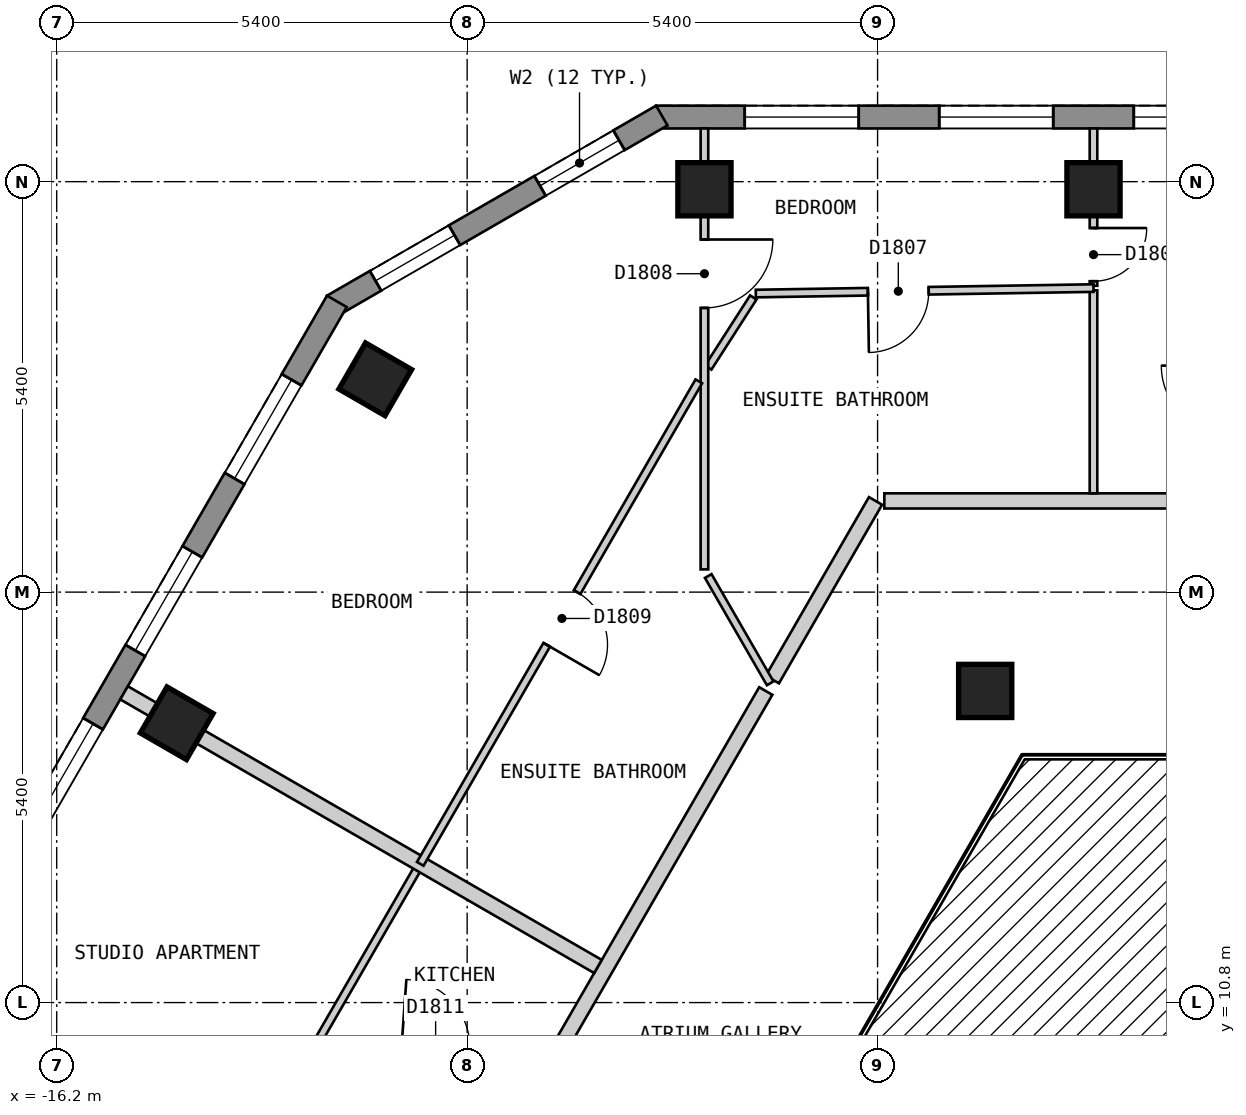
"""IFC4 building model, lengths in metres.
Left out: names, types, materials, properties, quantities, classifications, styles, units other than length and angle.
Written with IfcOpenShell. Run it as: python <this file> out.ifc"""

import sys

from ifc_helpers import new_model, si_unit, direction, frame, frame_2d, origin, origin_2d, place, context, subcontext, project, spatial, polyline, rectangle, outline, extrude, element, fill, save


model = new_model("IFC4")
c1 = context("Model", 3, precision=1e-05, world=origin(), true_north=direction((0.0, 1.0)))
c2 = subcontext(c1, "Body", "Model", "MODEL_VIEW")
j1 = project(units=[si_unit("LENGTHUNIT", "METRE"), si_unit("PLANEANGLEUNIT", "RADIAN")], contexts=[c1])
p1 = place(None, origin())
s1 = spatial("IfcSite", under=j1, at=p1, CompositionType="ELEMENT")
p2 = place(p1, origin())
s2 = spatial("IfcBuilding", under=s1, at=p2, CompositionType="ELEMENT")
p3 = place(p2, frame((0.0, 0.0, 208.8)))
s3 = spatial("IfcBuildingStorey", under=s2, at=p3, CompositionType="ELEMENT", Elevation=208.8)
for number, where, z_axis, x_axis in (
    (1, (-2.559, 21.5, 0.0), (0.0, 0.0, 1.0), (-1.0, 0.0, 0.0)),
    (2, (-7.678, 21.5, 0.0), (0.0, 0.0, 1.0), (-1.0, 0.0, 0.0)),
    (3, (-12.009, 19.0, 0.0), (0.0, 0.0, 1.0), (-0.5, -0.866, 0.0)),
    (4, (-14.621, 14.475, 0.0), (0.0, 0.0, 1.0), (-0.5, -0.866, 0.0)),
    (5, (-3.984, 14.9, 0.0), (0.0, 0.0, 1.0), (1.0, 0.0, 0.0)),
):
    element("IfcColumn", number, at=place(p3, frame(where, z_axis=z_axis, x_axis=x_axis)), inside=s3, PredefinedType="COLUMN", context=c2, shape_type="SweptSolid", body=[
        extrude(rectangle(XDim=0.7, YDim=0.7, at=origin_2d()), origin(), (0.0, 0.0, 1.0), 3.0),
    ])
p4 = place(p3, frame((8.314, 22.45, 0.0), z_axis=(0.0, 0.0, 1.0), x_axis=(-1.0, 0.0, 0.0)))
e6 = element("IfcWall", 6, at=p4, inside=s3, PredefinedType="SOLIDWALL", context=c2, shape_type="SweptSolid", body=[
    extrude(outline(polyline([(0.0, -0.15), (16.628, -0.15), (16.548, 0.15), (0.08, 0.15), (0.0, -0.15)])), origin(), (0.0, 0.0, 1.0), 2.7),
])
p5 = place(p4, frame((1.165, 0.0, 0.15)))
e7 = element("IfcOpeningElement", 7, at=p5, cuts=e6, PredefinedType="OPENING", context=c2, shape_type="SweptSolid", body=[
    extrude(rectangle(XDim=1.5, YDim=2.1, at=frame_2d((0.75, 1.05))), frame((0.0, 0.16, 0.0), z_axis=(0.0, -1.0, 0.0), x_axis=(1.0, 0.0, 0.0)), (0.0, 0.0, 1.0), 0.32),
])
p6 = place(p4, frame((3.724, 0.0, 0.15)))
e8 = element("IfcOpeningElement", 8, at=p6, cuts=e6, PredefinedType="OPENING", context=c2, shape_type="SweptSolid", body=[
    extrude(rectangle(XDim=1.5, YDim=2.1, at=frame_2d((0.75, 1.05))), frame((0.0, 0.16, 0.0), z_axis=(0.0, -1.0, 0.0), x_axis=(1.0, 0.0, 0.0)), (0.0, 0.0, 1.0), 0.32),
])
p7 = place(p4, frame((6.284, 0.0, 0.15)))
e9 = element("IfcOpeningElement", 9, at=p7, cuts=e6, PredefinedType="OPENING", context=c2, shape_type="SweptSolid", body=[
    extrude(rectangle(XDim=1.5, YDim=2.1, at=frame_2d((0.75, 1.05))), frame((0.0, 0.16, 0.0), z_axis=(0.0, -1.0, 0.0), x_axis=(1.0, 0.0, 0.0)), (0.0, 0.0, 1.0), 0.32),
])
p8 = place(p4, frame((8.843, 0.0, 0.15)))
e10 = element("IfcOpeningElement", 10, at=p8, cuts=e6, PredefinedType="OPENING", context=c2, shape_type="SweptSolid", body=[
    extrude(rectangle(XDim=1.5, YDim=2.1, at=frame_2d((0.75, 1.05))), frame((0.0, 0.16, 0.0), z_axis=(0.0, -1.0, 0.0), x_axis=(1.0, 0.0, 0.0)), (0.0, 0.0, 1.0), 0.32),
])
p9 = place(p4, frame((11.403, 0.0, 0.15)))
e11 = element("IfcOpeningElement", 11, at=p9, cuts=e6, PredefinedType="OPENING", context=c2, shape_type="SweptSolid", body=[
    extrude(rectangle(XDim=1.5, YDim=2.1, at=frame_2d((0.75, 1.05))), frame((0.0, 0.16, 0.0), z_axis=(0.0, -1.0, 0.0), x_axis=(1.0, 0.0, 0.0)), (0.0, 0.0, 1.0), 0.32),
])
p10 = place(p4, frame((13.962, 0.0, 0.15)))
e12 = element("IfcOpeningElement", 12, at=p10, cuts=e6, PredefinedType="OPENING", context=c2, shape_type="SweptSolid", body=[
    extrude(rectangle(XDim=1.5, YDim=2.1, at=frame_2d((0.75, 1.05))), frame((0.0, 0.16, 0.0), z_axis=(0.0, -1.0, 0.0), x_axis=(1.0, 0.0, 0.0)), (0.0, 0.0, 1.0), 0.32),
])
p11 = place(p3, frame((-8.239, 22.47, 0.0), z_axis=(0.0, 0.0, 1.0), x_axis=(-0.866022959057, -0.500004234368, 0.0)))
e13 = element("IfcWall", 13, at=p11, inside=s3, PredefinedType="SOLIDWALL", context=c2, shape_type="SweptSolid", body=[
    extrude(outline(polyline([(0.0, -0.15), (5.0, -0.15), (4.92, 0.15), (0.08, 0.15), (0.0, -0.15)])), origin(), (0.0, 0.0, 1.0), 2.7),
])
p12 = place(p11, frame((0.65, 0.0, 0.15)))
e14 = element("IfcOpeningElement", 14, at=p12, cuts=e13, PredefinedType="OPENING", context=c2, shape_type="SweptSolid", body=[
    extrude(rectangle(XDim=1.2, YDim=2.1, at=frame_2d((0.6, 1.05))), frame((0.0, 0.16, 0.0), z_axis=(0.0, -1.0, 0.0), x_axis=(1.0, 0.0, 0.0)), (0.0, 0.0, 1.0), 0.32),
])
p13 = place(p11, frame((3.149, 0.0, 0.15)))
e15 = element("IfcOpeningElement", 15, at=p13, cuts=e13, PredefinedType="OPENING", context=c2, shape_type="SweptSolid", body=[
    extrude(rectangle(XDim=1.2, YDim=2.1, at=frame_2d((0.6, 1.05))), frame((0.0, 0.16, 0.0), z_axis=(0.0, -1.0, 0.0), x_axis=(1.0, 0.0, 0.0)), (0.0, 0.0, 1.0), 0.32),
])
p14 = place(p3, frame((-12.514, 20.025, 0.0), z_axis=(0.0, 0.0, 1.0), x_axis=(-0.500003656944, -0.866023292436, 0.0)))
e16 = element("IfcWall", 16, at=p14, inside=s3, PredefinedType="SOLIDWALL", context=c2, shape_type="SweptSolid", body=[
    extrude(outline(polyline([(0.0, -0.15), (22.17, -0.15), (22.09, 0.15), (0.08, 0.15), (0.0, -0.15)])), origin(), (0.0, 0.0, 1.0), 2.7),
])
p15 = place(p14, frame((1.191, 0.0, 0.15)))
e17 = element("IfcOpeningElement", 17, at=p15, cuts=e16, PredefinedType="OPENING", context=c2, shape_type="SweptSolid", body=[
    extrude(rectangle(XDim=1.5, YDim=2.1, at=frame_2d((0.75, 1.05))), frame((0.0, 0.16, 0.0), z_axis=(0.0, -1.0, 0.0), x_axis=(1.0, 0.0, 0.0)), (0.0, 0.0, 1.0), 0.32),
])
p16 = place(p14, frame((3.804, 0.0, 0.15)))
e18 = element("IfcOpeningElement", 18, at=p16, cuts=e16, PredefinedType="OPENING", context=c2, shape_type="SweptSolid", body=[
    extrude(rectangle(XDim=1.5, YDim=2.1, at=frame_2d((0.75, 1.05))), frame((0.0, 0.16, 0.0), z_axis=(0.0, -1.0, 0.0), x_axis=(1.0, 0.0, 0.0)), (0.0, 0.0, 1.0), 0.32),
])
p17 = place(p14, frame((6.416, 0.0, 0.15)))
e19 = element("IfcOpeningElement", 19, at=p17, cuts=e16, PredefinedType="OPENING", context=c2, shape_type="SweptSolid", body=[
    extrude(rectangle(XDim=1.5, YDim=2.1, at=frame_2d((0.75, 1.05))), frame((0.0, 0.16, 0.0), z_axis=(0.0, -1.0, 0.0), x_axis=(1.0, 0.0, 0.0)), (0.0, 0.0, 1.0), 0.32),
])
p18 = place(p14, frame((9.029, 0.0, 0.15)))
e20 = element("IfcOpeningElement", 20, at=p18, cuts=e16, PredefinedType="OPENING", context=c2, shape_type="SweptSolid", body=[
    extrude(rectangle(XDim=1.5, YDim=2.1, at=frame_2d((0.75, 1.05))), frame((0.0, 0.16, 0.0), z_axis=(0.0, -1.0, 0.0), x_axis=(1.0, 0.0, 0.0)), (0.0, 0.0, 1.0), 0.32),
])
p19 = place(p14, frame((11.641, 0.0, 0.15)))
e21 = element("IfcOpeningElement", 21, at=p19, cuts=e16, PredefinedType="OPENING", context=c2, shape_type="SweptSolid", body=[
    extrude(rectangle(XDim=1.5, YDim=2.1, at=frame_2d((0.75, 1.05))), frame((0.0, 0.16, 0.0), z_axis=(0.0, -1.0, 0.0), x_axis=(1.0, 0.0, 0.0)), (0.0, 0.0, 1.0), 0.32),
])
p20 = place(p14, frame((14.254, 0.0, 0.15)))
e22 = element("IfcOpeningElement", 22, at=p20, cuts=e16, PredefinedType="OPENING", context=c2, shape_type="SweptSolid", body=[
    extrude(rectangle(XDim=1.5, YDim=2.1, at=frame_2d((0.75, 1.05))), frame((0.0, 0.16, 0.0), z_axis=(0.0, -1.0, 0.0), x_axis=(1.0, 0.0, 0.0)), (0.0, 0.0, 1.0), 0.32),
])
p21 = place(p14, frame((16.866, 0.0, 0.15)))
e23 = element("IfcOpeningElement", 23, at=p21, cuts=e16, PredefinedType="OPENING", context=c2, shape_type="SweptSolid", body=[
    extrude(rectangle(XDim=1.5, YDim=2.1, at=frame_2d((0.75, 1.05))), frame((0.0, 0.16, 0.0), z_axis=(0.0, -1.0, 0.0), x_axis=(1.0, 0.0, 0.0)), (0.0, 0.0, 1.0), 0.32),
])
p22 = place(p14, frame((19.479, 0.0, 0.15)))
e24 = element("IfcOpeningElement", 24, at=p22, cuts=e16, PredefinedType="OPENING", context=c2, shape_type="SweptSolid", body=[
    extrude(rectangle(XDim=1.5, YDim=2.1, at=frame_2d((0.75, 1.05))), frame((0.0, 0.16, 0.0), z_axis=(0.0, -1.0, 0.0), x_axis=(1.0, 0.0, 0.0)), (0.0, 0.0, 1.0), 0.32),
])
p23 = place(p3, frame((-5.311, 17.4, 0.0), z_axis=(0.0, 0.0, 1.0), x_axis=(1.0, 0.0, 0.0)))
e25 = element("IfcWall", 25, at=p23, inside=s3, PredefinedType="PARTITIONING", context=c2, shape_type="SweptSolid", body=[
    extrude(rectangle(XDim=10.737, YDim=0.2, at=frame_2d((5.369, 0.0))), origin(), (0.0, 0.0, 1.0), 2.7),
])
p24 = place(p23, frame((4.812, 0.0, 0.0)))
e26 = element("IfcOpeningElement", 26, at=p24, cuts=e25, PredefinedType="OPENING", context=c2, shape_type="SweptSolid", body=[
    extrude(rectangle(XDim=1.0, YDim=2.1, at=frame_2d((0.5, 1.05))), frame((0.0, 0.11, 0.0), z_axis=(0.0, -1.0, 0.0), x_axis=(1.0, 0.0, 0.0)), (0.0, 0.0, 1.0), 0.22),
])
p25 = place(p3, frame((-10.826, 8.048, 0.0), z_axis=(0.0, 0.0, 1.0), x_axis=(0.499953104851, 0.866052477019, 0.0)))
e27 = element("IfcWall", 27, at=p25, inside=s3, PredefinedType="PARTITIONING", context=c2, shape_type="SweptSolid", body=[
    extrude(rectangle(XDim=7.91, YDim=0.2, at=frame_2d((3.955, 0.0))), origin(), (0.0, 0.0, 1.0), 2.7),
])
p26 = place(p25, frame((0.603, 0.0, 0.0)))
e28 = element("IfcOpeningElement", 28, at=p26, cuts=e27, PredefinedType="OPENING", context=c2, shape_type="SweptSolid", body=[
    extrude(rectangle(XDim=1.0, YDim=2.1, at=frame_2d((0.5, 1.05))), frame((0.0, 0.11, 0.0), z_axis=(0.0, -1.0, 0.0), x_axis=(1.0, 0.0, 0.0)), (0.0, 0.0, 1.0), 0.22),
])
p27 = place(p3, frame((-6.784, 15.05, 0.0), z_axis=(0.0, 0.0, 1.0), x_axis=(0.500067724834, 0.865986299303, 0.0)))
e29 = element("IfcWall", 29, at=p27, inside=s3, PredefinedType="PARTITIONING", context=c2, shape_type="SweptSolid", body=[
    extrude(rectangle(XDim=2.713, YDim=0.2, at=frame_2d((1.357, 0.0))), origin(), (0.0, 0.0, 1.0), 2.7),
])
p28 = place(p3, frame((-7.628, 16.412, 0.0), z_axis=(0.0, 0.0, 1.0), x_axis=(0.499843439945, -0.866115774908, 0.0)))
e30 = element("IfcWall", 30, at=p28, inside=s3, PredefinedType="PARTITIONING", context=c2, shape_type="SweptSolid", body=[
    extrude(rectangle(XDim=1.63, YDim=0.1, at=frame_2d((0.815, 0.0))), origin(), (0.0, 0.0, 1.0), 2.7),
])
p29 = place(p3, frame((-2.559, 20.17, 0.0), z_axis=(0.0, 0.0, 1.0), x_axis=(0.0, -1.0, 0.0)))
e31 = element("IfcWall", 31, at=p29, inside=s3, PredefinedType="PARTITIONING", context=c2, shape_type="SweptSolid", body=[
    extrude(rectangle(XDim=2.67, YDim=0.1, at=frame_2d((1.335, 0.0))), origin(), (0.0, 0.0, 1.0), 2.7),
])
p30 = place(p3, frame((-7.628, 19.154, 0.0), z_axis=(0.0, 0.0, 1.0), x_axis=(0.540600102017, 0.841279697663, 0.0)))
e32 = element("IfcWall", 32, at=p30, inside=s3, PredefinedType="PARTITIONING", context=c2, shape_type="SweptSolid", body=[
    extrude(rectangle(XDim=1.097, YDim=0.1, at=frame_2d((0.548, 0.0))), origin(), (0.0, 0.0, 1.0), 2.7),
])
p31 = place(p3, frame((-12.778, 10.268, 0.0), z_axis=(0.0, 0.0, 1.0), x_axis=(0.500084799062, 0.865976439487, 0.0)))
e33 = element("IfcWall", 33, at=p31, inside=s3, PredefinedType="PARTITIONING", context=c2, shape_type="SweptSolid", body=[
    extrude(rectangle(XDim=2.722, YDim=0.1, at=frame_2d((1.361, 0.0))), origin(), (0.0, 0.0, 1.0), 2.7),
])
p32 = place(p3, frame((-7.678, 16.499, 0.0), z_axis=(0.0, 0.0, 1.0), x_axis=(0.0, 1.0, 0.0)))
e34 = element("IfcWall", 34, at=p32, inside=s3, PredefinedType="PARTITIONING", context=c2, shape_type="SweptSolid", body=[
    extrude(rectangle(XDim=5.801, YDim=0.1, at=frame_2d((2.9, 0.0))), origin(), (0.0, 0.0, 1.0), 2.7),
])
p33 = place(p32, frame((3.44, 0.0, 0.0)))
e35 = element("IfcOpeningElement", 35, at=p33, cuts=e34, PredefinedType="OPENING", context=c2, shape_type="SweptSolid", body=[
    extrude(rectangle(XDim=0.9, YDim=2.1, at=frame_2d((0.45, 1.05))), frame((0.0, 0.06, 0.0), z_axis=(0.0, -1.0, 0.0), x_axis=(1.0, 0.0, 0.0)), (0.0, 0.0, 1.0), 0.12),
])
p34 = place(p3, frame((-2.559, 20.23, 0.0), z_axis=(0.0, 0.0, 1.0), x_axis=(0.0, 1.0, 0.0)))
e36 = element("IfcWall", 36, at=p34, inside=s3, PredefinedType="PARTITIONING", context=c2, shape_type="SweptSolid", body=[
    extrude(rectangle(XDim=2.07, YDim=0.1, at=frame_2d((1.035, 0.0))), origin(), (0.0, 0.0, 1.0), 2.7),
])
p35 = place(p34, frame((0.06, 0.0, 0.0)))
e37 = element("IfcOpeningElement", 37, at=p35, cuts=e36, PredefinedType="OPENING", context=c2, shape_type="SweptSolid", body=[
    extrude(rectangle(XDim=0.7, YDim=2.1, at=frame_2d((0.35, 1.05))), frame((0.0, 0.06, 0.0), z_axis=(0.0, -1.0, 0.0), x_axis=(1.0, 0.0, 0.0)), (0.0, 0.0, 1.0), 0.12),
])
p36 = place(p3, frame((-7.002, 20.128, 0.0), z_axis=(0.0, 0.0, 1.0), x_axis=(0.999868634558, 0.016208443081, 0.0)))
e38 = element("IfcWall", 38, at=p36, inside=s3, PredefinedType="PARTITIONING", context=c2, shape_type="SweptSolid", body=[
    extrude(rectangle(XDim=4.443, YDim=0.1, at=frame_2d((2.222, 0.0))), origin(), (0.0, 0.0, 1.0), 2.7),
])
p37 = place(p36, frame((1.475, 0.0, 0.0)))
e39 = element("IfcOpeningElement", 39, at=p37, cuts=e38, PredefinedType="OPENING", context=c2, shape_type="SweptSolid", body=[
    extrude(rectangle(XDim=0.8, YDim=2.1, at=frame_2d((0.4, 1.05))), frame((0.0, 0.06, 0.0), z_axis=(0.0, -1.0, 0.0), x_axis=(1.0, 0.0, 0.0)), (0.0, 0.0, 1.0), 0.12),
])
p38 = place(p3, frame((-17.926, 10.35, 0.0), z_axis=(0.0, 0.0, 1.0), x_axis=(0.866018411306, -0.500012111133, 0.0)))
e40 = element("IfcWall", 40, at=p38, inside=s3, PredefinedType="PARTITIONING", context=c2, shape_type="SweptSolid", body=[
    extrude(rectangle(XDim=9.898, YDim=0.2, at=frame_2d((4.949, 0.0))), origin(), (0.0, 0.0, 1.0), 2.7),
])
p39 = place(p3, frame((-15.314, 14.875, 0.0), z_axis=(0.0, 0.0, 1.0), x_axis=(0.866001485781, -0.500041424909, 0.0)))
e41 = element("IfcWall", 41, at=p39, inside=s3, PredefinedType="PARTITIONING", context=c2, shape_type="SweptSolid", body=[
    extrude(rectangle(XDim=7.2, YDim=0.2, at=frame_2d((3.6, 0.0))), origin(), (0.0, 0.0, 1.0), 2.7),
])
p40 = place(p3, frame((-11.417, 12.625, 0.0), z_axis=(0.0, 0.0, 1.0), x_axis=(0.500007885066, 0.866020851292, 0.0)))
e42 = element("IfcWall", 42, at=p40, inside=s3, PredefinedType="PARTITIONING", context=c2, shape_type="SweptSolid", body=[
    extrude(rectangle(XDim=7.33, YDim=0.1, at=frame_2d((3.665, 0.0))), origin(), (0.0, 0.0, 1.0), 2.7),
])
p41 = place(p40, frame((3.328, 0.0, 0.0)))
e43 = element("IfcOpeningElement", 43, at=p41, cuts=e42, PredefinedType="OPENING", context=c2, shape_type="SweptSolid", body=[
    extrude(rectangle(XDim=0.8, YDim=2.1, at=frame_2d((0.4, 1.05))), frame((0.0, 0.06, 0.0), z_axis=(0.0, -1.0, 0.0), x_axis=(1.0, 0.0, 0.0)), (0.0, 0.0, 1.0), 0.12),
])
p42 = place(p8, origin())
e44 = element("IfcWindow", 44, at=p42, inside=s3, PartitioningType="SINGLE_PANEL", PredefinedType="WINDOW", context=c2, shape_type="SweptSolid", body=[
    extrude(rectangle(XDim=1.5, YDim=2.1, at=frame_2d((0.75, 1.05))), frame((0.0, 0.03, 0.0), z_axis=(0.0, -1.0, 0.0), x_axis=(1.0, 0.0, 0.0)), (0.0, 0.0, 1.0), 0.06),
])
fill(e10, e44)
p43 = place(p9, origin())
e45 = element("IfcWindow", 45, at=p43, inside=s3, PartitioningType="SINGLE_PANEL", PredefinedType="WINDOW", context=c2, shape_type="SweptSolid", body=[
    extrude(rectangle(XDim=1.5, YDim=2.1, at=frame_2d((0.75, 1.05))), frame((0.0, 0.03, 0.0), z_axis=(0.0, -1.0, 0.0), x_axis=(1.0, 0.0, 0.0)), (0.0, 0.0, 1.0), 0.06),
])
fill(e11, e45)
p44 = place(p10, origin())
e46 = element("IfcWindow", 46, at=p44, inside=s3, PartitioningType="SINGLE_PANEL", PredefinedType="WINDOW", context=c2, shape_type="SweptSolid", body=[
    extrude(rectangle(XDim=1.5, YDim=2.1, at=frame_2d((0.75, 1.05))), frame((0.0, 0.03, 0.0), z_axis=(0.0, -1.0, 0.0), x_axis=(1.0, 0.0, 0.0)), (0.0, 0.0, 1.0), 0.06),
])
fill(e12, e46)
p45 = place(p12, origin())
e47 = element("IfcWindow", 47, at=p45, inside=s3, PartitioningType="SINGLE_PANEL", PredefinedType="WINDOW", context=c2, shape_type="SweptSolid", body=[
    extrude(rectangle(XDim=1.2, YDim=2.1, at=frame_2d((0.6, 1.05))), frame((0.0, 0.03, 0.0), z_axis=(0.0, -1.0, 0.0), x_axis=(1.0, 0.0, 0.0)), (0.0, 0.0, 1.0), 0.06),
])
fill(e14, e47)
p46 = place(p13, origin())
e48 = element("IfcWindow", 48, at=p46, inside=s3, PartitioningType="SINGLE_PANEL", PredefinedType="WINDOW", context=c2, shape_type="SweptSolid", body=[
    extrude(rectangle(XDim=1.2, YDim=2.1, at=frame_2d((0.6, 1.05))), frame((0.0, 0.03, 0.0), z_axis=(0.0, -1.0, 0.0), x_axis=(1.0, 0.0, 0.0)), (0.0, 0.0, 1.0), 0.06),
])
fill(e15, e48)
p47 = place(p15, origin())
e49 = element("IfcWindow", 49, at=p47, inside=s3, PartitioningType="SINGLE_PANEL", PredefinedType="WINDOW", context=c2, shape_type="SweptSolid", body=[
    extrude(rectangle(XDim=1.5, YDim=2.1, at=frame_2d((0.75, 1.05))), frame((0.0, 0.03, 0.0), z_axis=(0.0, -1.0, 0.0), x_axis=(1.0, 0.0, 0.0)), (0.0, 0.0, 1.0), 0.06),
])
fill(e17, e49)
p48 = place(p16, origin())
e50 = element("IfcWindow", 50, at=p48, inside=s3, PartitioningType="SINGLE_PANEL", PredefinedType="WINDOW", context=c2, shape_type="SweptSolid", body=[
    extrude(rectangle(XDim=1.5, YDim=2.1, at=frame_2d((0.75, 1.05))), frame((0.0, 0.03, 0.0), z_axis=(0.0, -1.0, 0.0), x_axis=(1.0, 0.0, 0.0)), (0.0, 0.0, 1.0), 0.06),
])
fill(e18, e50)
p49 = place(p17, origin())
e51 = element("IfcWindow", 51, at=p49, inside=s3, PartitioningType="SINGLE_PANEL", PredefinedType="WINDOW", context=c2, shape_type="SweptSolid", body=[
    extrude(rectangle(XDim=1.5, YDim=2.1, at=frame_2d((0.75, 1.05))), frame((0.0, 0.03, 0.0), z_axis=(0.0, -1.0, 0.0), x_axis=(1.0, 0.0, 0.0)), (0.0, 0.0, 1.0), 0.06),
])
fill(e19, e51)
p50 = place(p35, origin())
e52 = element("IfcDoor", 52, at=p50, inside=s3, OperationType="SINGLE_SWING_RIGHT", PredefinedType="DOOR", context=c2, shape_type="SweptSolid", body=[
    extrude(rectangle(XDim=0.7, YDim=2.1, at=frame_2d((0.35, 1.05))), frame((0.0, 0.025, 0.0), z_axis=(0.0, -1.0, 0.0), x_axis=(1.0, 0.0, 0.0)), (0.0, 0.0, 1.0), 0.05),
])
fill(e37, e52)
p51 = place(p37, origin())
e53 = element("IfcDoor", 53, at=p51, inside=s3, OperationType="SINGLE_SWING_LEFT", PredefinedType="DOOR", context=c2, shape_type="SweptSolid", body=[
    extrude(rectangle(XDim=0.8, YDim=2.1, at=frame_2d((0.4, 1.05))), frame((0.0, 0.025, 0.0), z_axis=(0.0, -1.0, 0.0), x_axis=(1.0, 0.0, 0.0)), (0.0, 0.0, 1.0), 0.05),
])
fill(e39, e53)
p52 = place(p33, origin())
e54 = element("IfcDoor", 54, at=p52, inside=s3, OperationType="SINGLE_SWING_RIGHT", PredefinedType="DOOR", context=c2, shape_type="SweptSolid", body=[
    extrude(rectangle(XDim=0.9, YDim=2.1, at=frame_2d((0.45, 1.05))), frame((0.0, 0.025, 0.0), z_axis=(0.0, -1.0, 0.0), x_axis=(1.0, 0.0, 0.0)), (0.0, 0.0, 1.0), 0.05),
])
fill(e35, e54)
p53 = place(p41, origin())
e55 = element("IfcDoor", 55, at=p53, inside=s3, OperationType="SINGLE_SWING_LEFT", PredefinedType="DOOR", context=c2, shape_type="SweptSolid", body=[
    extrude(rectangle(XDim=0.8, YDim=2.1, at=frame_2d((0.4, 1.05))), frame((0.0, 0.025, 0.0), z_axis=(0.0, -1.0, 0.0), x_axis=(1.0, 0.0, 0.0)), (0.0, 0.0, 1.0), 0.05),
])
fill(e43, e55)
save(model, sys.argv[1])
